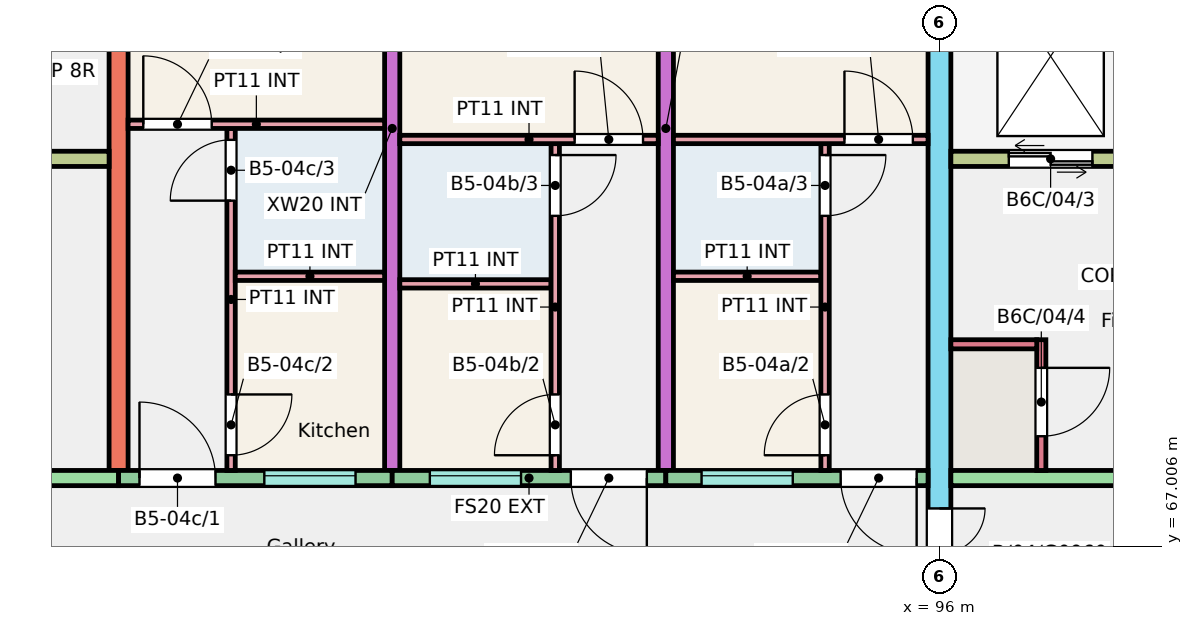
"""IFC4 building model, lengths in metres.
Left out: names, types, materials, properties, quantities, classifications, styles, units other than length and angle.
Written with IfcOpenShell. Run it as: python <this file> out.ifc"""

import sys

from ifc_helpers import new_model, si_unit, direction, frame, frame_2d, origin, place, context, subcontext, project, spatial, rectangle, extrude, element, fill, save


model = new_model("IFC4")
c1 = context("Model", 3, precision=1e-05, world=origin(), true_north=direction((0.0, 1.0)))
c2 = subcontext(c1, "Body", "Model", "MODEL_VIEW")
j1 = project(units=[si_unit("LENGTHUNIT", "METRE"), si_unit("PLANEANGLEUNIT", "RADIAN")], contexts=[c1])
p1 = place(None, origin())
s1 = spatial("IfcSite", under=j1, at=p1, CompositionType="ELEMENT")
p2 = place(p1, origin())
s2 = spatial("IfcBuilding", under=s1, at=p2, CompositionType="ELEMENT")
p3 = place(p2, frame((0.0, 0.0, 12.0)))
s3 = spatial("IfcBuildingStorey", under=s2, at=p3, CompositionType="ELEMENT", Elevation=12.0)
p4 = place(p3, frame((85.2, 68.0, 0.0), z_axis=(0.0, 0.0, 1.0), x_axis=(0.0, 1.0, 0.0)))
e1 = element("IfcWall", 1, at=p4, inside=s3, PredefinedType="SHEAR", context=c2, shape_type="SweptSolid", body=[
    extrude(rectangle(XDim=9.0, YDim=0.25, at=frame_2d((4.5, 0.0))), origin(), (0.0, 0.0, 1.0), 3.0),
])
for number, where, z_axis, x_axis in (
    (2, (88.8, 68.0, 0.0), (0.0, 0.0, 1.0), (0.0, 1.0, 0.0)),
    (3, (92.4, 68.0, 0.0), (0.0, 0.0, 1.0), (0.0, 1.0, 0.0)),
):
    element("IfcWall", number, at=place(p3, frame(where, z_axis=z_axis, x_axis=x_axis)), inside=s3, PredefinedType="SHEAR", context=c2, shape_type="SweptSolid", body=[
        extrude(rectangle(XDim=9.0, YDim=0.2, at=frame_2d((4.5, 0.0))), origin(), (0.0, 0.0, 1.0), 3.0),
    ])
p5 = place(p3, frame((96.0, 66.0, 0.0), z_axis=(0.0, 0.0, 1.0), x_axis=(0.0, 1.0, 0.0)))
e4 = element("IfcWall", 4, at=p5, inside=s3, PredefinedType="SHEAR", context=c2, shape_type="SweptSolid", body=[
    extrude(rectangle(XDim=11.0, YDim=0.3, at=frame_2d((5.5, 0.0))), origin(), (0.0, 0.0, 1.0), 3.0),
])
p6 = place(p5, frame((0.3, 0.0, 0.0)))
e5 = element("IfcOpeningElement", 5, at=p6, cuts=e4, PredefinedType="OPENING", context=c2, shape_type="SweptSolid", body=[
    extrude(rectangle(XDim=1.2, YDim=2.1, at=frame_2d((0.6, 1.05))), frame((0.0, 0.16, 0.0), z_axis=(0.0, -1.0, 0.0), x_axis=(1.0, 0.0, 0.0)), (0.0, 0.0, 1.0), 0.32),
])
p7 = place(p3, frame((79.35, 67.9, 0.0), z_axis=(0.0, 0.0, 1.0), x_axis=(1.0, 0.0, 0.0)))
e6 = element("IfcWall", 6, at=p7, inside=s3, PredefinedType="SHEAR", context=c2, shape_type="SweptSolid", body=[
    extrude(rectangle(XDim=5.85, YDim=0.2, at=frame_2d((2.925, 0.0))), origin(), (0.0, 0.0, 1.0), 3.0),
])
p8 = place(p7, frame((2.312, 0.0, 0.0)))
e7 = element("IfcOpeningElement", 7, at=p8, cuts=e6, PredefinedType="OPENING", context=c2, shape_type="SweptSolid", body=[
    extrude(rectangle(XDim=1.1, YDim=2.1, at=frame_2d((0.55, 1.05))), frame((0.0, 0.11, 0.0), z_axis=(0.0, -1.0, 0.0), x_axis=(1.0, 0.0, 0.0)), (0.0, 0.0, 1.0), 0.22),
])
p9 = place(p3, frame((79.35, 72.1, 0.0), z_axis=(0.0, 0.0, 1.0), x_axis=(1.0, 0.0, 0.0)))
e8 = element("IfcWall", 8, at=p9, inside=s3, PredefinedType="SHEAR", context=c2, shape_type="SweptSolid", body=[
    extrude(rectangle(XDim=5.725, YDim=0.2, at=frame_2d((2.862, 0.0))), origin(), (0.0, 0.0, 1.0), 3.0),
])
p10 = place(p9, frame((3.775, 0.0, 0.0)))
e9 = element("IfcOpeningElement", 9, at=p10, cuts=e8, PredefinedType="OPENING", context=c2, shape_type="SweptSolid", body=[
    extrude(rectangle(XDim=1.0, YDim=2.1, at=frame_2d((0.5, 1.05))), frame((0.0, 0.11, 0.0), z_axis=(0.0, -1.0, 0.0), x_axis=(1.0, 0.0, 0.0)), (0.0, 0.0, 1.0), 0.22),
])
p11 = place(p9, frame((0.762, 0.0, 0.0)))
e10 = element("IfcOpeningElement", 10, at=p11, cuts=e8, PredefinedType="OPENING", context=c2, shape_type="SweptSolid", body=[
    extrude(rectangle(XDim=1.1, YDim=2.1, at=frame_2d((0.55, 1.05))), frame((0.0, 0.11, 0.0), z_axis=(0.0, -1.0, 0.0), x_axis=(1.0, 0.0, 0.0)), (0.0, 0.0, 1.0), 0.22),
])
p12 = place(p3, frame((85.2, 67.9, 0.0), z_axis=(0.0, 0.0, 1.0), x_axis=(1.0, 0.0, 0.0)))
e11 = element("IfcWall", 11, at=p12, inside=s3, PredefinedType="SOLIDWALL", context=c2, shape_type="SweptSolid", body=[
    extrude(rectangle(XDim=3.6, YDim=0.2, at=frame_2d((1.8, 0.0))), origin(), (0.0, 0.0, 1.0), 3.0),
])
p13 = place(p12, frame((1.917, 0.0, 1.1)))
e12 = element("IfcOpeningElement", 12, at=p13, cuts=e11, PredefinedType="OPENING", context=c2, shape_type="SweptSolid", body=[
    extrude(rectangle(XDim=1.2, YDim=1.3, at=frame_2d((0.6, 0.65))), frame((0.0, 0.11, 0.0), z_axis=(0.0, -1.0, 0.0), x_axis=(1.0, 0.0, 0.0)), (0.0, 0.0, 1.0), 0.22),
])
p14 = place(p12, frame((0.275, 0.0, 0.0)))
e13 = element("IfcOpeningElement", 13, at=p14, cuts=e11, PredefinedType="OPENING", context=c2, shape_type="SweptSolid", body=[
    extrude(rectangle(XDim=1.0, YDim=2.1, at=frame_2d((0.5, 1.05))), frame((0.0, 0.11, 0.0), z_axis=(0.0, -1.0, 0.0), x_axis=(1.0, 0.0, 0.0)), (0.0, 0.0, 1.0), 0.22),
])
p15 = place(p3, frame((88.8, 67.9, 0.0), z_axis=(0.0, 0.0, 1.0), x_axis=(1.0, 0.0, 0.0)))
e14 = element("IfcWall", 14, at=p15, inside=s3, PredefinedType="SOLIDWALL", context=c2, shape_type="SweptSolid", body=[
    extrude(rectangle(XDim=3.6, YDim=0.2, at=frame_2d((1.8, 0.0))), origin(), (0.0, 0.0, 1.0), 3.0),
])
p16 = place(p15, frame((0.495, 0.0, 1.1)))
e15 = element("IfcOpeningElement", 15, at=p16, cuts=e14, PredefinedType="OPENING", context=c2, shape_type="SweptSolid", body=[
    extrude(rectangle(XDim=1.2, YDim=1.3, at=frame_2d((0.6, 0.65))), frame((0.0, 0.11, 0.0), z_axis=(0.0, -1.0, 0.0), x_axis=(1.0, 0.0, 0.0)), (0.0, 0.0, 1.0), 0.22),
])
p17 = place(p15, frame((2.35, 0.0, 0.0)))
e16 = element("IfcOpeningElement", 16, at=p17, cuts=e14, PredefinedType="OPENING", context=c2, shape_type="SweptSolid", body=[
    extrude(rectangle(XDim=1.0, YDim=2.1, at=frame_2d((0.5, 1.05))), frame((0.0, 0.11, 0.0), z_axis=(0.0, -1.0, 0.0), x_axis=(1.0, 0.0, 0.0)), (0.0, 0.0, 1.0), 0.22),
])
p18 = place(p3, frame((92.4, 67.9, 0.0), z_axis=(0.0, 0.0, 1.0), x_axis=(1.0, 0.0, 0.0)))
e17 = element("IfcWall", 17, at=p18, inside=s3, PredefinedType="SOLIDWALL", context=c2, shape_type="SweptSolid", body=[
    extrude(rectangle(XDim=3.45, YDim=0.2, at=frame_2d((1.725, 0.0))), origin(), (0.0, 0.0, 1.0), 3.0),
])
p19 = place(p18, frame((0.47, 0.0, 1.1)))
e18 = element("IfcOpeningElement", 18, at=p19, cuts=e17, PredefinedType="OPENING", context=c2, shape_type="SweptSolid", body=[
    extrude(rectangle(XDim=1.2, YDim=1.3, at=frame_2d((0.6, 0.65))), frame((0.0, 0.11, 0.0), z_axis=(0.0, -1.0, 0.0), x_axis=(1.0, 0.0, 0.0)), (0.0, 0.0, 1.0), 0.22),
])
p20 = place(p18, frame((2.3, 0.0, 0.0)))
e19 = element("IfcOpeningElement", 19, at=p20, cuts=e17, PredefinedType="OPENING", context=c2, shape_type="SweptSolid", body=[
    extrude(rectangle(XDim=1.0, YDim=2.1, at=frame_2d((0.5, 1.05))), frame((0.0, 0.11, 0.0), z_axis=(0.0, -1.0, 0.0), x_axis=(1.0, 0.0, 0.0)), (0.0, 0.0, 1.0), 0.22),
])
p21 = place(p3, frame((96.15, 67.9, 0.0), z_axis=(0.0, 0.0, 1.0), x_axis=(1.0, 0.0, 0.0)))
e20 = element("IfcWall", 20, at=p21, inside=s3, PredefinedType="SHEAR", context=c2, shape_type="SweptSolid", body=[
    extrude(rectangle(XDim=5.85, YDim=0.2, at=frame_2d((2.925, 0.0))), origin(), (0.0, 0.0, 1.0), 3.0),
])
p22 = place(p21, frame((2.312, 0.0, 0.0)))
e21 = element("IfcOpeningElement", 21, at=p22, cuts=e20, PredefinedType="OPENING", context=c2, shape_type="SweptSolid", body=[
    extrude(rectangle(XDim=1.1, YDim=2.1, at=frame_2d((0.55, 1.05))), frame((0.0, 0.11, 0.0), z_axis=(0.0, -1.0, 0.0), x_axis=(1.0, 0.0, 0.0)), (0.0, 0.0, 1.0), 0.22),
])
p23 = place(p3, frame((96.15, 72.1, 0.0), z_axis=(0.0, 0.0, 1.0), x_axis=(1.0, 0.0, 0.0)))
e22 = element("IfcWall", 22, at=p23, inside=s3, PredefinedType="SHEAR", context=c2, shape_type="SweptSolid", body=[
    extrude(rectangle(XDim=5.725, YDim=0.2, at=frame_2d((2.863, 0.0))), origin(), (0.0, 0.0, 1.0), 3.0),
])
p24 = place(p23, frame((3.775, 0.0, 0.0)))
e23 = element("IfcOpeningElement", 23, at=p24, cuts=e22, PredefinedType="OPENING", context=c2, shape_type="SweptSolid", body=[
    extrude(rectangle(XDim=1.0, YDim=2.1, at=frame_2d((0.5, 1.05))), frame((0.0, 0.11, 0.0), z_axis=(0.0, -1.0, 0.0), x_axis=(1.0, 0.0, 0.0)), (0.0, 0.0, 1.0), 0.22),
])
p25 = place(p23, frame((0.762, 0.0, 0.0)))
e24 = element("IfcOpeningElement", 24, at=p25, cuts=e22, PredefinedType="OPENING", context=c2, shape_type="SweptSolid", body=[
    extrude(rectangle(XDim=1.1, YDim=2.1, at=frame_2d((0.55, 1.05))), frame((0.0, 0.11, 0.0), z_axis=(0.0, -1.0, 0.0), x_axis=(1.0, 0.0, 0.0)), (0.0, 0.0, 1.0), 0.22),
])
p26 = place(p3, frame((97.34, 68.0, 0.0), z_axis=(0.0, 0.0, 1.0), x_axis=(0.0, 1.0, 0.0)))
e25 = element("IfcWall", 25, at=p26, inside=s3, PredefinedType="SHEAR", context=c2, shape_type="SweptSolid", body=[
    extrude(rectangle(XDim=1.72, YDim=0.12, at=frame_2d((0.86, 0.0))), origin(), (0.0, 0.0, 1.0), 3.0),
])
p27 = place(p26, frame((0.45, 0.0, 0.0)))
e26 = element("IfcOpeningElement", 26, at=p27, cuts=e25, PredefinedType="OPENING", context=c2, shape_type="SweptSolid", body=[
    extrude(rectangle(XDim=0.9, YDim=2.1, at=frame_2d((0.45, 1.05))), frame((0.0, 0.07, 0.0), z_axis=(0.0, -1.0, 0.0), x_axis=(1.0, 0.0, 0.0)), (0.0, 0.0, 1.0), 0.14),
])
p28 = place(p3, frame((96.15, 69.66, 0.0), z_axis=(0.0, 0.0, 1.0), x_axis=(1.0, 0.0, 0.0)))
e27 = element("IfcWall", 27, at=p28, inside=s3, PredefinedType="SHEAR", context=c2, shape_type="SweptSolid", body=[
    extrude(rectangle(XDim=1.13, YDim=0.12, at=frame_2d((0.565, 0.0))), origin(), (0.0, 0.0, 1.0), 3.0),
])
p29 = place(p3, frame((92.5, 70.555, 0.0), z_axis=(0.0, 0.0, 1.0), x_axis=(1.0, 0.0, 0.0)))
e28 = element("IfcWall", 28, at=p29, inside=s3, PredefinedType="PARTITIONING", context=c2, shape_type="SweptSolid", body=[
    extrude(rectangle(XDim=1.94, YDim=0.11, at=frame_2d((0.97, 0.0))), origin(), (0.0, 0.0, 1.0), 2.8),
])
p30 = place(p3, frame((94.495, 68.0, 0.0), z_axis=(0.0, 0.0, 1.0), x_axis=(0.0, 1.0, 0.0)))
e29 = element("IfcWall", 29, at=p30, inside=s3, PredefinedType="PARTITIONING", context=c2, shape_type="SweptSolid", body=[
    extrude(rectangle(XDim=4.3, YDim=0.11, at=frame_2d((2.15, 0.0))), origin(), (0.0, 0.0, 1.0), 2.8),
])
p31 = place(p30, frame((0.2, 0.0, 0.0)))
e30 = element("IfcOpeningElement", 30, at=p31, cuts=e29, PredefinedType="OPENING", context=c2, shape_type="SweptSolid", body=[
    extrude(rectangle(XDim=0.8, YDim=2.1, at=frame_2d((0.4, 1.05))), frame((0.0, 0.065, 0.0), z_axis=(0.0, -1.0, 0.0), x_axis=(1.0, 0.0, 0.0)), (0.0, 0.0, 1.0), 0.13),
])
p32 = place(p30, frame((3.35, 0.0, 0.0)))
e31 = element("IfcOpeningElement", 31, at=p32, cuts=e29, PredefinedType="OPENING", context=c2, shape_type="SweptSolid", body=[
    extrude(rectangle(XDim=0.8, YDim=2.1, at=frame_2d((0.4, 1.05))), frame((0.0, 0.065, 0.0), z_axis=(0.0, -1.0, 0.0), x_axis=(1.0, 0.0, 0.0)), (0.0, 0.0, 1.0), 0.13),
])
p33 = place(p3, frame((92.5, 72.355, 0.0), z_axis=(0.0, 0.0, 1.0), x_axis=(1.0, 0.0, 0.0)))
e32 = element("IfcWall", 32, at=p33, inside=s3, PredefinedType="PARTITIONING", context=c2, shape_type="SweptSolid", body=[
    extrude(rectangle(XDim=3.35, YDim=0.11, at=frame_2d((1.675, 0.0))), origin(), (0.0, 0.0, 1.0), 2.8),
])
p34 = place(p33, frame((2.25, 0.0, 0.0)))
e33 = element("IfcOpeningElement", 33, at=p34, cuts=e32, PredefinedType="OPENING", context=c2, shape_type="SweptSolid", body=[
    extrude(rectangle(XDim=0.9, YDim=2.1, at=frame_2d((0.45, 1.05))), frame((0.0, 0.065, 0.0), z_axis=(0.0, -1.0, 0.0), x_axis=(1.0, 0.0, 0.0)), (0.0, 0.0, 1.0), 0.13),
])
p35 = place(p3, frame((88.9, 70.455, 0.0), z_axis=(0.0, 0.0, 1.0), x_axis=(1.0, 0.0, 0.0)))
e34 = element("IfcWall", 34, at=p35, inside=s3, PredefinedType="PARTITIONING", context=c2, shape_type="SweptSolid", body=[
    extrude(rectangle(XDim=1.99, YDim=0.11, at=frame_2d((0.995, 0.0))), origin(), (0.0, 0.0, 1.0), 2.8),
])
p36 = place(p3, frame((90.945, 68.0, 0.0), z_axis=(0.0, 0.0, 1.0), x_axis=(0.0, 1.0, 0.0)))
e35 = element("IfcWall", 35, at=p36, inside=s3, PredefinedType="PARTITIONING", context=c2, shape_type="SweptSolid", body=[
    extrude(rectangle(XDim=4.3, YDim=0.11, at=frame_2d((2.15, 0.0))), origin(), (0.0, 0.0, 1.0), 2.8),
])
p37 = place(p36, frame((0.2, 0.0, 0.0)))
e36 = element("IfcOpeningElement", 36, at=p37, cuts=e35, PredefinedType="OPENING", context=c2, shape_type="SweptSolid", body=[
    extrude(rectangle(XDim=0.8, YDim=2.1, at=frame_2d((0.4, 1.05))), frame((0.0, 0.065, 0.0), z_axis=(0.0, -1.0, 0.0), x_axis=(1.0, 0.0, 0.0)), (0.0, 0.0, 1.0), 0.13),
])
p38 = place(p36, frame((3.35, 0.0, 0.0)))
e37 = element("IfcOpeningElement", 37, at=p38, cuts=e35, PredefinedType="OPENING", context=c2, shape_type="SweptSolid", body=[
    extrude(rectangle(XDim=0.8, YDim=2.1, at=frame_2d((0.4, 1.05))), frame((0.0, 0.065, 0.0), z_axis=(0.0, -1.0, 0.0), x_axis=(1.0, 0.0, 0.0)), (0.0, 0.0, 1.0), 0.13),
])
p39 = place(p3, frame((88.9, 72.355, 0.0), z_axis=(0.0, 0.0, 1.0), x_axis=(1.0, 0.0, 0.0)))
e38 = element("IfcWall", 38, at=p39, inside=s3, PredefinedType="PARTITIONING", context=c2, shape_type="SweptSolid", body=[
    extrude(rectangle(XDim=3.4, YDim=0.11, at=frame_2d((1.7, 0.0))), origin(), (0.0, 0.0, 1.0), 2.8),
])
p40 = place(p39, frame((2.3, 0.0, 0.0)))
e39 = element("IfcOpeningElement", 39, at=p40, cuts=e38, PredefinedType="OPENING", context=c2, shape_type="SweptSolid", body=[
    extrude(rectangle(XDim=0.9, YDim=2.1, at=frame_2d((0.45, 1.05))), frame((0.0, 0.065, 0.0), z_axis=(0.0, -1.0, 0.0), x_axis=(1.0, 0.0, 0.0)), (0.0, 0.0, 1.0), 0.13),
])
p41 = place(p3, frame((86.68, 68.0, 0.0), z_axis=(0.0, 0.0, 1.0), x_axis=(0.0, 1.0, 0.0)))
e40 = element("IfcWall", 40, at=p41, inside=s3, PredefinedType="PARTITIONING", context=c2, shape_type="SweptSolid", body=[
    extrude(rectangle(XDim=4.5, YDim=0.11, at=frame_2d((2.25, 0.0))), origin(), (0.0, 0.0, 1.0), 2.8),
])
p42 = place(p41, frame((0.2, 0.0, 0.0)))
e41 = element("IfcOpeningElement", 41, at=p42, cuts=e40, PredefinedType="OPENING", context=c2, shape_type="SweptSolid", body=[
    extrude(rectangle(XDim=0.8, YDim=2.1, at=frame_2d((0.4, 1.05))), frame((0.0, 0.065, 0.0), z_axis=(0.0, -1.0, 0.0), x_axis=(1.0, 0.0, 0.0)), (0.0, 0.0, 1.0), 0.13),
])
p43 = place(p41, frame((3.55, 0.0, 0.0)))
e42 = element("IfcOpeningElement", 42, at=p43, cuts=e40, PredefinedType="OPENING", context=c2, shape_type="SweptSolid", body=[
    extrude(rectangle(XDim=0.8, YDim=2.1, at=frame_2d((0.4, 1.05))), frame((0.0, 0.065, 0.0), z_axis=(0.0, -1.0, 0.0), x_axis=(1.0, 0.0, 0.0)), (0.0, 0.0, 1.0), 0.13),
])
p44 = place(p3, frame((86.735, 70.555, 0.0), z_axis=(0.0, 0.0, 1.0), x_axis=(1.0, 0.0, 0.0)))
e43 = element("IfcWall", 43, at=p44, inside=s3, PredefinedType="PARTITIONING", context=c2, shape_type="SweptSolid", body=[
    extrude(rectangle(XDim=1.965, YDim=0.11, at=frame_2d((0.982, 0.0))), origin(), (0.0, 0.0, 1.0), 2.8),
])
p45 = place(p3, frame((85.325, 72.555, 0.0), z_axis=(0.0, 0.0, 1.0), x_axis=(1.0, 0.0, 0.0)))
e44 = element("IfcWall", 44, at=p45, inside=s3, PredefinedType="PARTITIONING", context=c2, shape_type="SweptSolid", body=[
    extrude(rectangle(XDim=3.375, YDim=0.11, at=frame_2d((1.688, 0.0))), origin(), (0.0, 0.0, 1.0), 2.8),
])
p46 = place(p45, frame((0.2, 0.0, 0.0)))
e45 = element("IfcOpeningElement", 45, at=p46, cuts=e44, PredefinedType="OPENING", context=c2, shape_type="SweptSolid", body=[
    extrude(rectangle(XDim=0.9, YDim=2.1, at=frame_2d((0.45, 1.05))), frame((0.0, 0.065, 0.0), z_axis=(0.0, -1.0, 0.0), x_axis=(1.0, 0.0, 0.0)), (0.0, 0.0, 1.0), 0.13),
])
p47 = place(p19, origin())
e46 = element("IfcWindow", 46, at=p47, inside=s3, PartitioningType="SINGLE_PANEL", PredefinedType="WINDOW", context=c2, shape_type="SweptSolid", body=[
    extrude(rectangle(XDim=1.2, YDim=1.3, at=frame_2d((0.6, 0.65))), frame((0.0, 0.06, 0.0), z_axis=(0.0, -1.0, 0.0), x_axis=(1.0, 0.0, 0.0)), (0.0, 0.0, 1.0), 0.06),
])
fill(e18, e46)
p48 = place(p16, origin())
e47 = element("IfcWindow", 47, at=p48, inside=s3, PartitioningType="SINGLE_PANEL", PredefinedType="WINDOW", context=c2, shape_type="SweptSolid", body=[
    extrude(rectangle(XDim=1.2, YDim=1.3, at=frame_2d((0.6, 0.65))), frame((0.0, 0.06, 0.0), z_axis=(0.0, -1.0, 0.0), x_axis=(1.0, 0.0, 0.0)), (0.0, 0.0, 1.0), 0.06),
])
fill(e15, e47)
p49 = place(p13, origin())
e48 = element("IfcWindow", 48, at=p49, inside=s3, PartitioningType="SINGLE_PANEL", PredefinedType="WINDOW", context=c2, shape_type="SweptSolid", body=[
    extrude(rectangle(XDim=1.2, YDim=1.3, at=frame_2d((0.6, 0.65))), frame((0.0, 0.06, 0.0), z_axis=(0.0, -1.0, 0.0), x_axis=(1.0, 0.0, 0.0)), (0.0, 0.0, 1.0), 0.06),
])
fill(e12, e48)
p50 = place(p20, origin())
e49 = element("IfcDoor", 49, at=p50, inside=s3, OperationType="SINGLE_SWING_RIGHT", PredefinedType="DOOR", context=c2, shape_type="SweptSolid", body=[
    extrude(rectangle(XDim=1.0, YDim=2.1, at=frame_2d((0.5, 1.05))), frame((0.0, 0.025, 0.0), z_axis=(0.0, -1.0, 0.0), x_axis=(1.0, 0.0, 0.0)), (0.0, 0.0, 1.0), 0.05),
])
fill(e19, e49)
p51 = place(p31, origin())
e50 = element("IfcDoor", 50, at=p51, inside=s3, OperationType="SINGLE_SWING_LEFT", PredefinedType="DOOR", context=c2, shape_type="SweptSolid", body=[
    extrude(rectangle(XDim=0.8, YDim=2.1, at=frame_2d((0.4, 1.05))), frame((0.0, 0.025, 0.0), z_axis=(0.0, -1.0, 0.0), x_axis=(1.0, 0.0, 0.0)), (0.0, 0.0, 1.0), 0.05),
])
fill(e30, e50)
p52 = place(p32, origin())
e51 = element("IfcDoor", 51, at=p52, inside=s3, OperationType="SINGLE_SWING_RIGHT", PredefinedType="DOOR", context=c2, shape_type="SweptSolid", body=[
    extrude(rectangle(XDim=0.8, YDim=2.1, at=frame_2d((0.4, 1.05))), frame((0.0, 0.025, 0.0), z_axis=(0.0, -1.0, 0.0), x_axis=(1.0, 0.0, 0.0)), (0.0, 0.0, 1.0), 0.05),
])
fill(e31, e51)
p53 = place(p34, origin())
e52 = element("IfcDoor", 52, at=p53, inside=s3, OperationType="SINGLE_SWING_LEFT", PredefinedType="DOOR", context=c2, shape_type="SweptSolid", body=[
    extrude(rectangle(XDim=0.9, YDim=2.1, at=frame_2d((0.45, 1.05))), frame((0.0, 0.025, 0.0), z_axis=(0.0, -1.0, 0.0), x_axis=(1.0, 0.0, 0.0)), (0.0, 0.0, 1.0), 0.05),
])
fill(e33, e52)
p54 = place(p17, origin())
e53 = element("IfcDoor", 53, at=p54, inside=s3, OperationType="SINGLE_SWING_RIGHT", PredefinedType="DOOR", context=c2, shape_type="SweptSolid", body=[
    extrude(rectangle(XDim=1.0, YDim=2.1, at=frame_2d((0.5, 1.05))), frame((0.0, 0.025, 0.0), z_axis=(0.0, -1.0, 0.0), x_axis=(1.0, 0.0, 0.0)), (0.0, 0.0, 1.0), 0.05),
])
fill(e16, e53)
p55 = place(p37, origin())
e54 = element("IfcDoor", 54, at=p55, inside=s3, OperationType="SINGLE_SWING_LEFT", PredefinedType="DOOR", context=c2, shape_type="SweptSolid", body=[
    extrude(rectangle(XDim=0.8, YDim=2.1, at=frame_2d((0.4, 1.05))), frame((0.0, 0.025, 0.0), z_axis=(0.0, -1.0, 0.0), x_axis=(1.0, 0.0, 0.0)), (0.0, 0.0, 1.0), 0.05),
])
fill(e36, e54)
p56 = place(p38, origin())
e55 = element("IfcDoor", 55, at=p56, inside=s3, OperationType="SINGLE_SWING_RIGHT", PredefinedType="DOOR", context=c2, shape_type="SweptSolid", body=[
    extrude(rectangle(XDim=0.8, YDim=2.1, at=frame_2d((0.4, 1.05))), frame((0.0, 0.025, 0.0), z_axis=(0.0, -1.0, 0.0), x_axis=(1.0, 0.0, 0.0)), (0.0, 0.0, 1.0), 0.05),
])
fill(e37, e55)
p57 = place(p40, origin())
e56 = element("IfcDoor", 56, at=p57, inside=s3, OperationType="SINGLE_SWING_LEFT", PredefinedType="DOOR", context=c2, shape_type="SweptSolid", body=[
    extrude(rectangle(XDim=0.9, YDim=2.1, at=frame_2d((0.45, 1.05))), frame((0.0, 0.025, 0.0), z_axis=(0.0, -1.0, 0.0), x_axis=(1.0, 0.0, 0.0)), (0.0, 0.0, 1.0), 0.05),
])
fill(e39, e56)
p58 = place(p14, origin())
e57 = element("IfcDoor", 57, at=p58, inside=s3, OperationType="SINGLE_SWING_LEFT", PredefinedType="DOOR", context=c2, shape_type="SweptSolid", body=[
    extrude(rectangle(XDim=1.0, YDim=2.1, at=frame_2d((0.5, 1.05))), frame((0.0, 0.025, 0.0), z_axis=(0.0, -1.0, 0.0), x_axis=(1.0, 0.0, 0.0)), (0.0, 0.0, 1.0), 0.05),
])
fill(e13, e57)
p59 = place(p42, origin())
e58 = element("IfcDoor", 58, at=p59, inside=s3, OperationType="SINGLE_SWING_RIGHT", PredefinedType="DOOR", context=c2, shape_type="SweptSolid", body=[
    extrude(rectangle(XDim=0.8, YDim=2.1, at=frame_2d((0.4, 1.05))), frame((0.0, 0.025, 0.0), z_axis=(0.0, -1.0, 0.0), x_axis=(1.0, 0.0, 0.0)), (0.0, 0.0, 1.0), 0.05),
])
fill(e41, e58)
p60 = place(p43, origin())
e59 = element("IfcDoor", 59, at=p60, inside=s3, OperationType="SINGLE_SWING_LEFT", PredefinedType="DOOR", context=c2, shape_type="SweptSolid", body=[
    extrude(rectangle(XDim=0.8, YDim=2.1, at=frame_2d((0.4, 1.05))), frame((0.0, 0.025, 0.0), z_axis=(0.0, -1.0, 0.0), x_axis=(1.0, 0.0, 0.0)), (0.0, 0.0, 1.0), 0.05),
])
fill(e42, e59)
p61 = place(p46, origin())
e60 = element("IfcDoor", 60, at=p61, inside=s3, OperationType="SINGLE_SWING_LEFT", PredefinedType="DOOR", context=c2, shape_type="SweptSolid", body=[
    extrude(rectangle(XDim=0.9, YDim=2.1, at=frame_2d((0.45, 1.05))), frame((0.0, 0.025, 0.0), z_axis=(0.0, -1.0, 0.0), x_axis=(1.0, 0.0, 0.0)), (0.0, 0.0, 1.0), 0.05),
])
fill(e45, e60)
p62 = place(p25, origin())
e61 = element("IfcDoor", 61, at=p62, inside=s3, OperationType="DOUBLE_DOOR_SLIDING", PredefinedType="DOOR", context=c2, shape_type="SweptSolid", body=[
    extrude(rectangle(XDim=1.1, YDim=2.1, at=frame_2d((0.55, 1.05))), frame((0.0, 0.025, 0.0), z_axis=(0.0, -1.0, 0.0), x_axis=(1.0, 0.0, 0.0)), (0.0, 0.0, 1.0), 0.05),
])
fill(e24, e61)
p63 = place(p27, origin())
e62 = element("IfcDoor", 62, at=p63, inside=s3, OperationType="SINGLE_SWING_RIGHT", PredefinedType="DOOR", context=c2, shape_type="SweptSolid", body=[
    extrude(rectangle(XDim=0.9, YDim=2.1, at=frame_2d((0.45, 1.05))), frame((0.0, 0.025, 0.0), z_axis=(0.0, -1.0, 0.0), x_axis=(1.0, 0.0, 0.0)), (0.0, 0.0, 1.0), 0.05),
])
fill(e26, e62)
p64 = place(p6, origin())
e63 = element("IfcDoor", 63, at=p64, inside=s3, OperationType="DOUBLE_DOOR_SINGLE_SWING", PredefinedType="DOOR", context=c2, shape_type="SweptSolid", body=[
    extrude(rectangle(XDim=1.2, YDim=2.1, at=frame_2d((0.6, 1.05))), frame((0.0, 0.025, 0.0), z_axis=(0.0, -1.0, 0.0), x_axis=(1.0, 0.0, 0.0)), (0.0, 0.0, 1.0), 0.05),
])
fill(e5, e63)
save(model, sys.argv[1])
